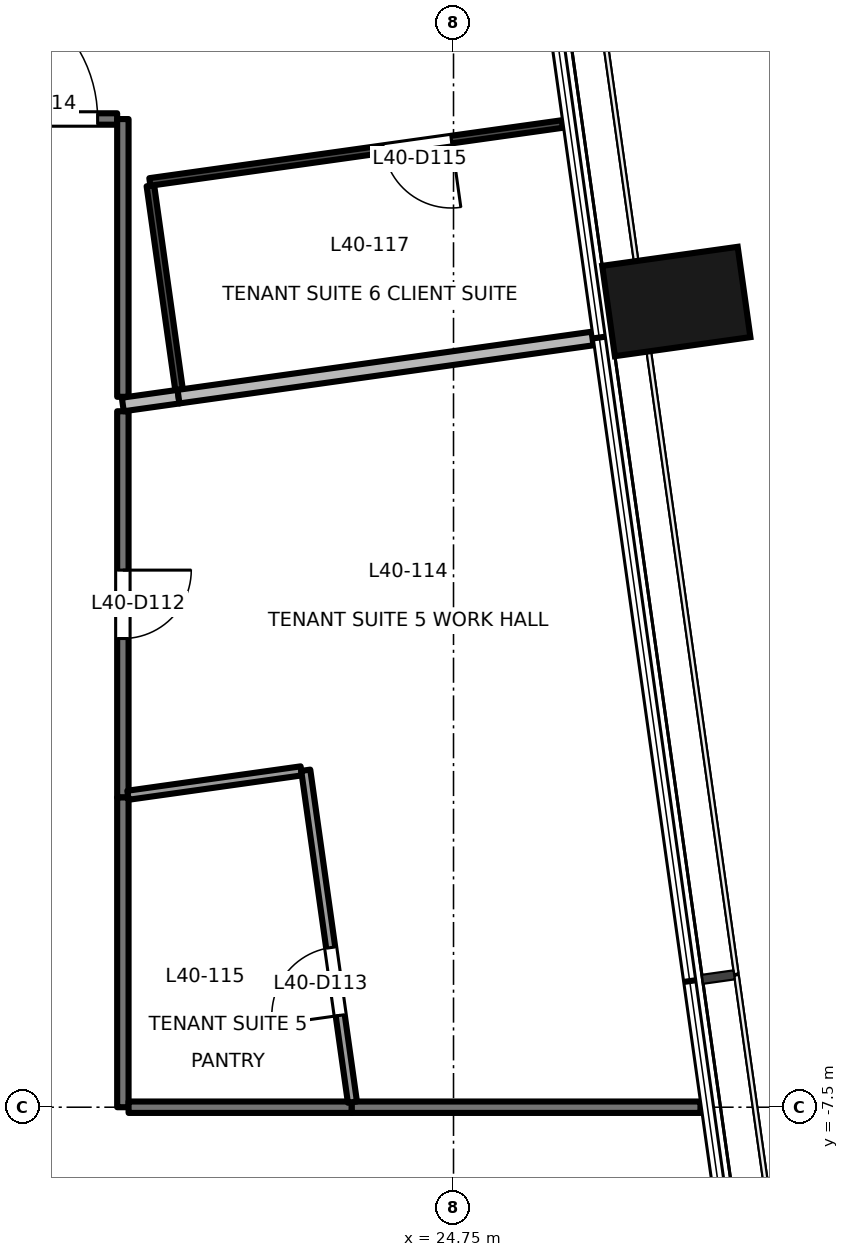
"""IFC4 building model, lengths in metres.
Left out: names, types, materials, properties, quantities, classifications, styles, units other than length and angle.
Written with IfcOpenShell. Run it as: python <this file> out.ifc"""

import sys

from ifc_helpers import new_model, si_unit, direction, frame, frame_2d, origin, origin_2d, place, context, subcontext, project, spatial, rectangle, extrude, element, fill, save


model = new_model("IFC4")
c1 = context("Model", 3, precision=1e-05, world=origin(), true_north=direction((0.0, 1.0)))
c2 = subcontext(c1, "Body", "Model", "MODEL_VIEW")
j1 = project(units=[si_unit("LENGTHUNIT", "METRE"), si_unit("PLANEANGLEUNIT", "RADIAN")], contexts=[c1])
p1 = place(None, origin())
s1 = spatial("IfcSite", under=j1, at=p1, CompositionType="ELEMENT")
p2 = place(p1, origin())
s2 = spatial("IfcBuilding", under=s1, at=p2, CompositionType="ELEMENT")
p3 = place(p2, frame((0.0, 0.0, 176.3)))
s3 = spatial("IfcBuildingStorey", under=s2, at=p3, CompositionType="ELEMENT", Elevation=176.3)
p4 = place(p3, frame((27.681, 3.1, -0.2), z_axis=(0.0, 0.0, 1.0), x_axis=(-0.139190384377, 0.990265639562, 0.0)))
e1 = element("IfcColumn", 1, at=p4, inside=s3, PredefinedType="COLUMN", context=c2, shape_type="SweptSolid", body=[
    extrude(rectangle(XDim=1.2, YDim=1.8, at=origin_2d()), origin(), (0.0, 0.0, 1.0), 3.9),
])
p5 = place(p3, frame((20.4, 1.656, 0.0), z_axis=(0.0, 0.0, 1.0), x_axis=(0.0, -1.0, 0.0)))
e2 = element("IfcWall", 2, at=p5, inside=s3, PredefinedType="PARTITIONING", context=c2, shape_type="SweptSolid", body=[
    extrude(rectangle(XDim=5.081, YDim=0.15, at=frame_2d((2.541, 0.0))), origin(), (0.0, 0.0, 1.0), 3.25),
])
p6 = place(p5, frame((2.09, 0.0, 0.0)))
e3 = element("IfcOpeningElement", 3, at=p6, cuts=e2, PredefinedType="OPENING", context=c2, shape_type="SweptSolid", body=[
    extrude(rectangle(XDim=0.9, YDim=2.1, at=frame_2d((0.45, 1.05))), frame((0.0, 0.085, 0.0), z_axis=(0.0, -1.0, 0.0), x_axis=(1.0, 0.0, 0.0)), (0.0, 0.0, 1.0), 0.171),
])
p7 = place(p3, frame((23.409, -7.5, 0.0), z_axis=(0.0, 0.0, 1.0), x_axis=(1.0, 0.0, 0.0)))
e4 = element("IfcWall", 4, at=p7, inside=s3, PredefinedType="PARTITIONING", context=c2, shape_type="SweptSolid", body=[
    extrude(rectangle(XDim=4.59, YDim=0.15, at=frame_2d((2.295, 0.0))), origin(), (0.0, 0.0, 1.0), 3.7),
])
p8 = place(p3, frame((20.4, -3.425, 0.0), z_axis=(0.0, 0.0, 1.0), x_axis=(0.0, -1.0, 0.0)))
e5 = element("IfcWall", 5, at=p8, inside=s3, PredefinedType="PARTITIONING", context=c2, shape_type="SweptSolid", body=[
    extrude(rectangle(XDim=4.075, YDim=0.15, at=frame_2d((2.038, 0.0))), origin(), (0.0, 0.0, 1.0), 3.25),
])
p9 = place(p3, frame((20.475, -7.5, 0.0), z_axis=(0.0, 0.0, 1.0), x_axis=(1.0, 0.0, 0.0)))
e6 = element("IfcWall", 6, at=p9, inside=s3, PredefinedType="PARTITIONING", context=c2, shape_type="SweptSolid", body=[
    extrude(rectangle(XDim=2.934, YDim=0.15, at=frame_2d((1.467, 0.0))), origin(), (0.0, 0.0, 1.0), 3.7),
])
p10 = place(p3, frame((18.0, 5.501, 0.0), z_axis=(0.0, 0.0, 1.0), x_axis=(1.0, 0.0, 0.0)))
e7 = element("IfcWall", 7, at=p10, inside=s3, PredefinedType="PARTITIONING", context=c2, shape_type="SweptSolid", body=[
    extrude(rectangle(XDim=2.325, YDim=0.15, at=frame_2d((1.163, 0.0))), origin(), (0.0, 0.0, 1.0), 3.7),
])
p11 = place(p10, frame((0.268, 0.0, 0.0)))
e8 = element("IfcOpeningElement", 8, at=p11, cuts=e7, PredefinedType="OPENING", context=c2, shape_type="SweptSolid", body=[
    extrude(rectangle(XDim=1.8, YDim=2.1, at=frame_2d((0.9, 1.05))), frame((0.0, 0.085, 0.0), z_axis=(0.0, -1.0, 0.0), x_axis=(1.0, 0.0, 0.0)), (0.0, 0.0, 1.0), 0.171),
])
p12 = place(p3, frame((20.4, 5.5, 0.0), z_axis=(0.0, 0.0, 1.0), x_axis=(0.0, -1.0, 0.0)))
e9 = element("IfcWall", 9, at=p12, inside=s3, PredefinedType="PARTITIONING", context=c2, shape_type="SweptSolid", body=[
    extrude(rectangle(XDim=3.654, YDim=0.15, at=frame_2d((1.827, 0.0))), origin(), (0.0, 0.0, 1.0), 3.25),
])
p13 = place(p3, frame((22.747, -3.075, 0.0), z_axis=(0.0, 0.0, 1.0), x_axis=(-0.990231660618, -0.139431912808, 0.0)))
e10 = element("IfcWall", 10, at=p13, inside=s3, PredefinedType="PARTITIONING", context=c2, shape_type="SweptSolid", body=[
    extrude(rectangle(XDim=2.302, YDim=0.12, at=frame_2d((1.151, 0.0))), origin(), (0.0, 0.0, 1.0), 3.7),
])
p14 = place(p3, frame((23.42, -7.433, 0.0), z_axis=(0.0, 0.0, 1.0), x_axis=(-0.13925822498, 0.99025610161, 0.0)))
e11 = element("IfcWall", 11, at=p14, inside=s3, PredefinedType="PARTITIONING", context=c2, shape_type="SweptSolid", body=[
    extrude(rectangle(XDim=4.409, YDim=0.12, at=frame_2d((2.205, 0.0))), origin(), (0.0, 0.0, 1.0), 3.25),
])
p15 = place(p14, frame((1.153, 0.0, 0.0)))
e12 = element("IfcOpeningElement", 12, at=p15, cuts=e11, PredefinedType="OPENING", context=c2, shape_type="SweptSolid", body=[
    extrude(rectangle(XDim=0.9, YDim=2.1, at=frame_2d((0.45, 1.05))), frame((0.0, 0.071, 0.0), z_axis=(0.0, -1.0, 0.0), x_axis=(1.0, 0.0, 0.0)), (0.0, 0.0, 1.0), 0.141),
])
p16 = place(p3, frame((20.399, 1.745, 0.0), z_axis=(0.0, 0.0, 1.0), x_axis=(0.990315465901, 0.138835434947, 0.0)))
e13 = element("IfcWall", 13, at=p16, inside=s3, PredefinedType="PARTITIONING", context=c2, shape_type="SweptSolid", body=[
    extrude(rectangle(XDim=0.74, YDim=0.18, at=frame_2d((0.37, 0.0))), origin(), (0.0, 0.0, 1.0), 3.7),
])
p17 = place(p3, frame((21.132, 1.848, 0.0), z_axis=(0.0, 0.0, 1.0), x_axis=(0.990277893792, 0.139103174181, 0.0)))
e14 = element("IfcWall", 14, at=p17, inside=s3, PredefinedType="PARTITIONING", context=c2, shape_type="SweptSolid", body=[
    extrude(rectangle(XDim=5.5, YDim=0.18, at=frame_2d((2.75, 0.0))), origin(), (0.0, 0.0, 1.0), 3.7),
])
p18 = place(p3, frame((20.762, 4.623, 0.0), z_axis=(0.0, 0.0, 1.0), x_axis=(0.139125052108, -0.990274820379, 0.0)))
e15 = element("IfcWall", 15, at=p18, inside=s3, PredefinedType="PARTITIONING", context=c2, shape_type="SweptSolid", body=[
    extrude(rectangle(XDim=2.709, YDim=0.1, at=frame_2d((1.355, 0.0))), origin(), (0.0, 0.0, 1.0), 3.25),
])
p19 = place(p3, frame((26.181, 5.435, 0.0), z_axis=(0.0, 0.0, 1.0), x_axis=(-0.990283537783, -0.13906298859, 0.0)))
e16 = element("IfcWall", 16, at=p19, inside=s3, PredefinedType="PARTITIONING", context=c2, shape_type="SweptSolid", body=[
    extrude(rectangle(XDim=5.479, YDim=0.1, at=frame_2d((2.74, 0.0))), origin(), (0.0, 0.0, 1.0), 3.7),
])
p20 = place(p19, frame((1.474, 0.0, 0.0)))
e17 = element("IfcOpeningElement", 17, at=p20, cuts=e16, PredefinedType="OPENING", context=c2, shape_type="SweptSolid", body=[
    extrude(rectangle(XDim=0.9, YDim=2.1, at=frame_2d((0.45, 1.05))), frame((0.0, 0.061, 0.0), z_axis=(0.0, -1.0, 0.0), x_axis=(1.0, 0.0, 0.0)), (0.0, 0.0, 1.0), 0.121),
])
p21 = place(p6, origin())
e18 = element("IfcDoor", 18, at=p21, inside=s3, OperationType="SINGLE_SWING_LEFT", PredefinedType="DOOR", context=c2, shape_type="SweptSolid", body=[
    extrude(rectangle(XDim=0.9, YDim=2.1, at=frame_2d((0.45, 1.05))), frame((0.0, 0.025, 0.0), z_axis=(0.0, -1.0, 0.0), x_axis=(1.0, 0.0, 0.0)), (0.0, 0.0, 1.0), 0.05),
])
fill(e3, e18)
p22 = place(p15, origin())
e19 = element("IfcDoor", 19, at=p22, inside=s3, OperationType="SINGLE_SWING_LEFT", PredefinedType="DOOR", context=c2, shape_type="SweptSolid", body=[
    extrude(rectangle(XDim=0.9, YDim=2.1, at=frame_2d((0.45, 1.05))), frame((0.0, 0.025, 0.0), z_axis=(0.0, -1.0, 0.0), x_axis=(1.0, 0.0, 0.0)), (0.0, 0.0, 1.0), 0.05),
])
fill(e12, e19)
p23 = place(p11, origin())
e20 = element("IfcDoor", 20, at=p23, inside=s3, OperationType="DOUBLE_DOOR_SINGLE_SWING", PredefinedType="DOOR", context=c2, shape_type="SweptSolid", body=[
    extrude(rectangle(XDim=1.8, YDim=2.1, at=frame_2d((0.9, 1.05))), frame((0.0, 0.025, 0.0), z_axis=(0.0, -1.0, 0.0), x_axis=(1.0, 0.0, 0.0)), (0.0, 0.0, 1.0), 0.05),
])
fill(e8, e20)
p24 = place(p20, origin())
e21 = element("IfcDoor", 21, at=p24, inside=s3, OperationType="SINGLE_SWING_LEFT", PredefinedType="DOOR", context=c2, shape_type="SweptSolid", body=[
    extrude(rectangle(XDim=0.9, YDim=2.1, at=frame_2d((0.45, 1.05))), frame((0.0, 0.025, 0.0), z_axis=(0.0, -1.0, 0.0), x_axis=(1.0, 0.0, 0.0)), (0.0, 0.0, 1.0), 0.05),
])
fill(e17, e21)
save(model, sys.argv[1])
